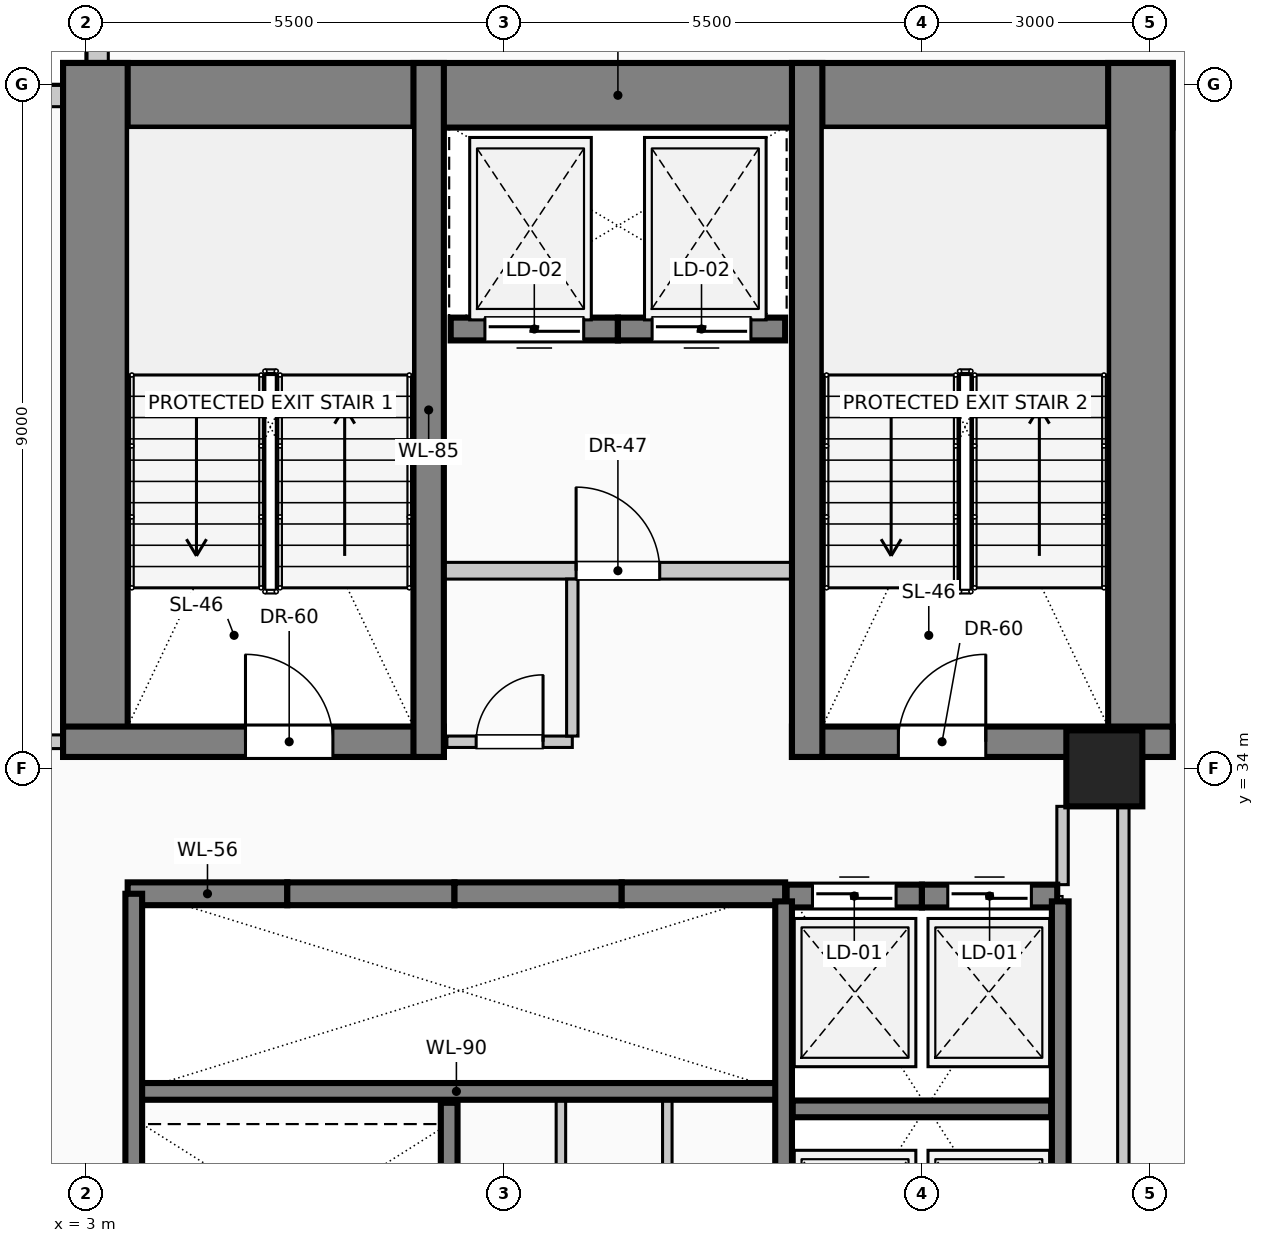
"""IFC4 building model, lengths in metres.
Left out: names, types, materials, properties, quantities, classifications, styles, units other than length and angle.
Written with IfcOpenShell. Run it as: python <this file> out.ifc"""

import sys

from ifc_helpers import new_model, si_unit, direction, frame, frame_2d, origin, origin_2d, place, context, subcontext, project, spatial, rectangle, circle, extrude, element, fill, save


model = new_model("IFC4")
c1 = context("Model", 3, precision=1e-05, world=origin(), true_north=direction((0.0, 1.0)))
c2 = subcontext(c1, "Body", "Model", "MODEL_VIEW")
j1 = project(units=[si_unit("LENGTHUNIT", "METRE"), si_unit("PLANEANGLEUNIT", "RADIAN")], contexts=[c1])
p1 = place(None, origin())
s1 = spatial("IfcSite", under=j1, at=p1, CompositionType="ELEMENT")
p2 = place(p1, origin())
s2 = spatial("IfcBuilding", under=s1, at=p2, CompositionType="ELEMENT")
p3 = place(p2, frame((0.0, 0.0, 156.6)))
s3 = spatial("IfcBuildingStorey", under=s2, at=p3, CompositionType="ELEMENT", Elevation=156.6)
p4 = place(p3, frame((2.7, 42.855, 0.0), z_axis=(0.0, 0.0, 1.0), x_axis=(1.0, 0.0, 0.0)))
e1 = element("IfcWall", 1, at=p4, inside=s3, PredefinedType="SHEAR", context=c2, shape_type="SweptSolid", body=[
    extrude(rectangle(XDim=14.6, YDim=0.85, at=frame_2d((7.3, 0.0))), origin(), (0.0, 0.0, 1.0), 4.0),
])
for number, where, z_axis, x_axis in (
    (2, (3.125, 34.15, 0.0), (0.0, 0.0, 1.0), (0.0, 1.0, 0.0)),
    (3, (16.875, 34.15, 0.0), (0.0, 0.0, 1.0), (0.0, 1.0, 0.0)),
):
    element("IfcWall", number, at=place(p3, frame(where, z_axis=z_axis, x_axis=x_axis)), inside=s3, PredefinedType="SHEAR", context=c2, shape_type="SweptSolid", body=[
        extrude(rectangle(XDim=9.13, YDim=0.85, at=frame_2d((4.565, 0.0))), origin(), (0.0, 0.0, 1.0), 4.0),
    ])
p5 = place(p3, frame((2.7, 34.35, 0.0), z_axis=(0.0, 0.0, 1.0), x_axis=(1.0, 0.0, 0.0)))
e4 = element("IfcWall", 4, at=p5, inside=s3, PredefinedType="SHEAR", context=c2, shape_type="SweptSolid", body=[
    extrude(rectangle(XDim=5.01, YDim=0.4, at=frame_2d((2.505, 0.0))), origin(), (0.0, 0.0, 1.0), 4.0),
])
p6 = place(p5, frame((2.4, 0.0, 0.0)))
e5 = element("IfcOpeningElement", 5, at=p6, cuts=e4, PredefinedType="OPENING", context=c2, shape_type="SweptSolid", body=[
    extrude(rectangle(XDim=1.15, YDim=2.2, at=frame_2d((0.575, 1.1))), frame((0.0, 0.21, 0.0), z_axis=(0.0, -1.0, 0.0), x_axis=(1.0, 0.0, 0.0)), (0.0, 0.0, 1.0), 0.42),
])
p7 = place(p3, frame((12.29, 34.35, 0.0), z_axis=(0.0, 0.0, 1.0), x_axis=(1.0, 0.0, 0.0)))
e6 = element("IfcWall", 6, at=p7, inside=s3, PredefinedType="SHEAR", context=c2, shape_type="SweptSolid", body=[
    extrude(rectangle(XDim=5.01, YDim=0.4, at=frame_2d((2.505, 0.0))), origin(), (0.0, 0.0, 1.0), 4.0),
])
p8 = place(p7, frame((1.4, 0.0, 0.0)))
e7 = element("IfcOpeningElement", 7, at=p8, cuts=e6, PredefinedType="OPENING", context=c2, shape_type="SweptSolid", body=[
    extrude(rectangle(XDim=1.15, YDim=2.2, at=frame_2d((0.575, 1.1))), frame((0.0, 0.21, 0.0), z_axis=(0.0, -1.0, 0.0), x_axis=(1.0, 0.0, 0.0)), (0.0, 0.0, 1.0), 0.42),
])
for number, where, z_axis, x_axis in (
    (8, (7.51, 34.15, 0.0), (0.0, 0.0, 1.0), (0.0, 1.0, 0.0)),
    (9, (12.49, 34.15, 0.0), (0.0, 0.0, 1.0), (0.0, 1.0, 0.0)),
):
    element("IfcWall", number, at=place(p3, frame(where, z_axis=z_axis, x_axis=x_axis)), inside=s3, PredefinedType="SHEAR", context=c2, shape_type="SweptSolid", body=[
        extrude(rectangle(XDim=9.13, YDim=0.4, at=frame_2d((4.565, 0.0))), origin(), (0.0, 0.0, 1.0), 4.0),
    ])
p9 = place(p3, frame((16.4, 34.0, 0.0), z_axis=(0.0, 0.0, 1.0), x_axis=(1.0, 0.0, 0.0)))
e10 = element("IfcColumn", 10, at=p9, inside=s3, PredefinedType="COLUMN", context=c2, shape_type="SweptSolid", body=[
    extrude(circle(Radius=0.5, at=origin_2d()), origin(), (0.0, 0.0, 1.0), 4.0),
])
p10 = place(p3, frame((0.6, 42.845, 0.0), z_axis=(0.0, 0.0, 1.0), x_axis=(1.0, 0.0, 0.0)))
e11 = element("IfcWall", 11, at=p10, inside=s3, PredefinedType="SOLIDWALL", context=c2, shape_type="SweptSolid", body=[
    extrude(rectangle(XDim=2.095, YDim=0.28, at=frame_2d((1.047, 0.0))), origin(), (0.0, 0.0, 1.0), 3.66),
])
p11 = place(p3, frame((3.155, 43.285, 0.0), z_axis=(0.0, 0.0, 1.0), x_axis=(0.0, 1.0, 0.0)))
e12 = element("IfcWall", 12, at=p11, inside=s3, PredefinedType="SOLIDWALL", context=c2, shape_type="SweptSolid", body=[
    extrude(rectangle(XDim=2.115, YDim=0.28, at=frame_2d((1.058, 0.0))), origin(), (0.0, 0.0, 1.0), 3.66),
])
p12 = place(p3, frame((12.22, 32.32, 0.0), z_axis=(0.0, 0.0, 1.0), x_axis=(1.0, 0.0, 0.0)))
e13 = element("IfcWall", 13, at=p12, inside=s3, PredefinedType="SOLIDWALL", context=c2, shape_type="SweptSolid", body=[
    extrude(rectangle(XDim=1.78, YDim=0.3, at=frame_2d((0.89, 0.0))), origin(), (0.0, 0.0, 1.0), 4.0),
])
p13 = place(p12, frame((0.34, 0.0, 0.0)))
e14 = element("IfcOpeningElement", 14, at=p13, cuts=e13, PredefinedType="OPENING", context=c2, shape_type="SweptSolid", body=[
    extrude(rectangle(XDim=1.1, YDim=2.2, at=frame_2d((0.55, 1.1))), frame((0.0, 0.16, 0.0), z_axis=(0.0, -1.0, 0.0), x_axis=(1.0, 0.0, 0.0)), (0.0, 0.0, 1.0), 0.32),
])
p14 = place(p3, frame((14.0, 32.32, 0.0), z_axis=(0.0, 0.0, 1.0), x_axis=(1.0, 0.0, 0.0)))
e15 = element("IfcWall", 15, at=p14, inside=s3, PredefinedType="SOLIDWALL", context=c2, shape_type="SweptSolid", body=[
    extrude(rectangle(XDim=1.78, YDim=0.3, at=frame_2d((0.89, 0.0))), origin(), (0.0, 0.0, 1.0), 4.0),
])
p15 = place(p14, frame((0.34, 0.0, 0.0)))
e16 = element("IfcOpeningElement", 16, at=p15, cuts=e15, PredefinedType="OPENING", context=c2, shape_type="SweptSolid", body=[
    extrude(rectangle(XDim=1.1, YDim=2.2, at=frame_2d((0.55, 1.1))), frame((0.0, 0.16, 0.0), z_axis=(0.0, -1.0, 0.0), x_axis=(1.0, 0.0, 0.0)), (0.0, 0.0, 1.0), 0.32),
])
p16 = place(p3, frame((3.55, 32.35, 0.0), z_axis=(0.0, 0.0, 1.0), x_axis=(1.0, 0.0, 0.0)))
e17 = element("IfcWall", 17, at=p16, inside=s3, PredefinedType="SOLIDWALL", context=c2, shape_type="SweptSolid", body=[
    extrude(rectangle(XDim=2.1, YDim=0.3, at=frame_2d((1.05, 0.0))), origin(), (0.0, 0.0, 1.0), 4.0),
])
p17 = place(p3, frame((5.65, 32.35, 0.0), z_axis=(0.0, 0.0, 1.0), x_axis=(1.0, 0.0, 0.0)))
e18 = element("IfcWall", 18, at=p17, inside=s3, PredefinedType="SOLIDWALL", context=c2, shape_type="SweptSolid", body=[
    extrude(rectangle(XDim=2.2, YDim=0.3, at=frame_2d((1.1, 0.0))), origin(), (0.0, 0.0, 1.0), 4.0),
])
p18 = place(p3, frame((7.85, 32.35, 0.0), z_axis=(0.0, 0.0, 1.0), x_axis=(1.0, 0.0, 0.0)))
e19 = element("IfcWall", 19, at=p18, inside=s3, PredefinedType="SOLIDWALL", context=c2, shape_type="SweptSolid", body=[
    extrude(rectangle(XDim=2.2, YDim=0.3, at=frame_2d((1.1, 0.0))), origin(), (0.0, 0.0, 1.0), 4.0),
])
p19 = place(p3, frame((10.05, 32.35, 0.0), z_axis=(0.0, 0.0, 1.0), x_axis=(1.0, 0.0, 0.0)))
e20 = element("IfcWall", 20, at=p19, inside=s3, PredefinedType="SOLIDWALL", context=c2, shape_type="SweptSolid", body=[
    extrude(rectangle(XDim=2.15, YDim=0.3, at=frame_2d((1.075, 0.0))), origin(), (0.0, 0.0, 1.0), 4.0),
])
p20 = place(p3, frame((10.0, 39.78, 0.0), z_axis=(0.0, 0.0, 1.0), x_axis=(-1.0, 0.0, 0.0)))
e21 = element("IfcWall", 21, at=p20, inside=s3, PredefinedType="SOLIDWALL", context=c2, shape_type="SweptSolid", body=[
    extrude(rectangle(XDim=2.2, YDim=0.3, at=frame_2d((1.1, 0.0))), origin(), (0.0, 0.0, 1.0), 4.0),
])
p21 = place(p20, frame((0.45, 0.0, 0.0)))
e22 = element("IfcOpeningElement", 22, at=p21, cuts=e21, PredefinedType="OPENING", context=c2, shape_type="SweptSolid", body=[
    extrude(rectangle(XDim=1.3, YDim=2.25, at=frame_2d((0.65, 1.125))), frame((0.0, 0.16, 0.0), z_axis=(0.0, -1.0, 0.0), x_axis=(1.0, 0.0, 0.0)), (0.0, 0.0, 1.0), 0.32),
])
p22 = place(p3, frame((12.2, 39.78, 0.0), z_axis=(0.0, 0.0, 1.0), x_axis=(-1.0, 0.0, 0.0)))
e23 = element("IfcWall", 23, at=p22, inside=s3, PredefinedType="SOLIDWALL", context=c2, shape_type="SweptSolid", body=[
    extrude(rectangle(XDim=2.2, YDim=0.3, at=frame_2d((1.1, 0.0))), origin(), (0.0, 0.0, 1.0), 4.0),
])
p23 = place(p22, frame((0.45, 0.0, 0.0)))
e24 = element("IfcOpeningElement", 24, at=p23, cuts=e23, PredefinedType="OPENING", context=c2, shape_type="SweptSolid", body=[
    extrude(rectangle(XDim=1.3, YDim=2.25, at=frame_2d((0.65, 1.125))), frame((0.0, 0.16, 0.0), z_axis=(0.0, -1.0, 0.0), x_axis=(1.0, 0.0, 0.0)), (0.0, 0.0, 1.0), 0.32),
])
p24 = place(p3, frame((3.55, 29.75, 0.0), z_axis=(0.0, 0.0, 1.0), x_axis=(1.0, 0.0, 0.0)))
e25 = element("IfcWall", 25, at=p24, inside=s3, PredefinedType="SOLIDWALL", context=c2, shape_type="SweptSolid", body=[
    extrude(rectangle(XDim=8.65, YDim=0.22, at=frame_2d((4.325, 0.0))), origin(), (0.0, 0.0, 1.0), 4.0),
])
p25 = place(p3, frame((3.63, 26.8, 0.0), z_axis=(0.0, 0.0, 1.0), x_axis=(0.0, 1.0, 0.0)))
e26 = element("IfcWall", 26, at=p25, inside=s3, PredefinedType="SOLIDWALL", context=c2, shape_type="SweptSolid", body=[
    extrude(rectangle(XDim=5.55, YDim=0.22, at=frame_2d((2.775, 0.0))), origin(), (0.0, 0.0, 1.0), 4.0),
])
p26 = place(p3, frame((7.78, 26.8, 0.0), z_axis=(0.0, 0.0, 1.0), x_axis=(0.0, 1.0, 0.0)))
e27 = element("IfcWall", 27, at=p26, inside=s3, PredefinedType="SOLIDWALL", context=c2, shape_type="SweptSolid", body=[
    extrude(rectangle(XDim=2.8, YDim=0.22, at=frame_2d((1.4, 0.0))), origin(), (0.0, 0.0, 1.0), 4.0),
])
for number, where, z_axis, x_axis in (
    (28, (12.18, 26.8, 0.0), (0.0, 0.0, 1.0), (0.0, 1.0, 0.0)),
    (29, (15.82, 26.8, 0.0), (0.0, 0.0, 1.0), (0.0, 1.0, 0.0)),
):
    element("IfcWall", number, at=place(p3, frame(where, z_axis=z_axis, x_axis=x_axis)), inside=s3, PredefinedType="SOLIDWALL", context=c2, shape_type="SweptSolid", body=[
        extrude(rectangle(XDim=5.45, YDim=0.22, at=frame_2d((2.725, 0.0))), origin(), (0.0, 0.0, 1.0), 4.0),
    ])
p27 = place(p3, frame((12.3, 29.52, 0.0), z_axis=(0.0, 0.0, 1.0), x_axis=(1.0, 0.0, 0.0)))
e30 = element("IfcWall", 30, at=p27, inside=s3, PredefinedType="SOLIDWALL", context=c2, shape_type="SweptSolid", body=[
    extrude(rectangle(XDim=3.4, YDim=0.22, at=frame_2d((1.7, 0.0))), origin(), (0.0, 0.0, 1.0), 4.0),
])
p28 = place(p3, frame((7.51, 36.6, 0.0), z_axis=(0.0, 0.0, 1.0), x_axis=(1.0, 0.0, 0.0)))
e31 = element("IfcWall", 31, at=p28, inside=s3, PredefinedType="PARTITIONING", context=c2, shape_type="SweptSolid", body=[
    extrude(rectangle(XDim=4.98, YDim=0.22, at=frame_2d((2.49, 0.0))), origin(), (0.0, 0.0, 1.0), 3.66),
])
p29 = place(p28, frame((1.94, 0.0, 0.0)))
e32 = element("IfcOpeningElement", 32, at=p29, cuts=e31, PredefinedType="OPENING", context=c2, shape_type="SweptSolid", body=[
    extrude(rectangle(XDim=1.1, YDim=2.2, at=frame_2d((0.55, 1.1))), frame((0.0, 0.12, 0.0), z_axis=(0.0, -1.0, 0.0), x_axis=(1.0, 0.0, 0.0)), (0.0, 0.0, 1.0), 0.24),
])
p30 = place(p3, frame((1.175, 34.35, 0.0), z_axis=(0.0, 0.0, 1.0), x_axis=(1.0, 0.0, 0.0)))
e33 = element("IfcWall", 33, at=p30, inside=s3, PredefinedType="PARTITIONING", context=c2, shape_type="SweptSolid", body=[
    extrude(rectangle(XDim=1.525, YDim=0.18, at=frame_2d((0.762, 0.0))), origin(), (0.0, 0.0, 1.0), 3.66),
])
p31 = place(p3, frame((7.75, 34.35, 0.0), z_axis=(0.0, 0.0, 1.0), x_axis=(1.0, 0.0, 0.0)))
e34 = element("IfcWall", 34, at=p31, inside=s3, PredefinedType="PARTITIONING", context=c2, shape_type="SweptSolid", body=[
    extrude(rectangle(XDim=1.65, YDim=0.15, at=frame_2d((0.825, 0.0))), origin(), (0.0, 0.0, 1.0), 3.66),
])
p32 = place(p31, frame((0.385, 0.0, 0.0)))
e35 = element("IfcOpeningElement", 35, at=p32, cuts=e34, PredefinedType="OPENING", context=c2, shape_type="SweptSolid", body=[
    extrude(rectangle(XDim=0.88, YDim=2.1, at=frame_2d((0.44, 1.05))), frame((0.0, 0.085, 0.0), z_axis=(0.0, -1.0, 0.0), x_axis=(1.0, 0.0, 0.0)), (0.0, 0.0, 1.0), 0.17),
])
p33 = place(p3, frame((9.25, 26.863, 0.0), z_axis=(0.0, 0.0, 1.0), x_axis=(0.0, 1.0, 0.0)))
e36 = element("IfcWall", 36, at=p33, inside=s3, PredefinedType="PARTITIONING", context=c2, shape_type="SweptSolid", body=[
    extrude(rectangle(XDim=2.777, YDim=0.125, at=frame_2d((1.389, 0.0))), origin(), (0.0, 0.0, 1.0), 3.66),
])
p34 = place(p3, frame((9.4, 34.425, 0.0), z_axis=(0.0, 0.0, 1.0), x_axis=(0.0, 1.0, 0.0)))
e37 = element("IfcWall", 37, at=p34, inside=s3, PredefinedType="PARTITIONING", context=c2, shape_type="SweptSolid", body=[
    extrude(rectangle(XDim=2.065, YDim=0.15, at=frame_2d((1.032, 0.0))), origin(), (0.0, 0.0, 1.0), 3.66),
])
p35 = place(p3, frame((10.65, 26.863, 0.0), z_axis=(0.0, 0.0, 1.0), x_axis=(0.0, 1.0, 0.0)))
e38 = element("IfcWall", 38, at=p35, inside=s3, PredefinedType="PARTITIONING", context=c2, shape_type="SweptSolid", body=[
    extrude(rectangle(XDim=2.777, YDim=0.125, at=frame_2d((1.389, 0.0))), origin(), (0.0, 0.0, 1.0), 3.66),
])
p36 = place(p3, frame((15.85, 32.47, 0.0), z_axis=(0.0, 0.0, 1.0), x_axis=(0.0, 1.0, 0.0)))
e39 = element("IfcWall", 39, at=p36, inside=s3, PredefinedType="PARTITIONING", context=c2, shape_type="SweptSolid", body=[
    extrude(rectangle(XDim=1.03, YDim=0.15, at=frame_2d((0.515, 0.0))), origin(), (0.0, 0.0, 1.0), 3.66),
])
p37 = place(p3, frame((16.65, 28.275, 0.0), z_axis=(0.0, 0.0, 1.0), x_axis=(0.0, 1.0, 0.0)))
e40 = element("IfcWall", 40, at=p37, inside=s3, PredefinedType="PARTITIONING", context=c2, shape_type="SweptSolid", body=[
    extrude(rectangle(XDim=5.225, YDim=0.15, at=frame_2d((2.613, 0.0))), origin(), (0.0, 0.0, 1.0), 3.005),
])
p38 = place(p13, origin())
e41 = element("IfcDoor", 41, at=p38, inside=s3, OperationType="SLIDING_TO_LEFT", PredefinedType="DOOR", context=c2, shape_type="SweptSolid", body=[
    extrude(rectangle(XDim=1.1, YDim=2.2, at=frame_2d((0.55, 1.1))), frame((0.0, 0.025, 0.0), z_axis=(0.0, -1.0, 0.0), x_axis=(1.0, 0.0, 0.0)), (0.0, 0.0, 1.0), 0.05),
])
fill(e14, e41)
p39 = place(p15, origin())
e42 = element("IfcDoor", 42, at=p39, inside=s3, OperationType="SLIDING_TO_RIGHT", PredefinedType="DOOR", context=c2, shape_type="SweptSolid", body=[
    extrude(rectangle(XDim=1.1, YDim=2.2, at=frame_2d((0.55, 1.1))), frame((0.0, 0.025, 0.0), z_axis=(0.0, -1.0, 0.0), x_axis=(1.0, 0.0, 0.0)), (0.0, 0.0, 1.0), 0.05),
])
fill(e16, e42)
p40 = place(p21, origin())
e43 = element("IfcDoor", 43, at=p40, inside=s3, OperationType="SLIDING_TO_LEFT", PredefinedType="DOOR", context=c2, shape_type="SweptSolid", body=[
    extrude(rectangle(XDim=1.3, YDim=2.25, at=frame_2d((0.65, 1.125))), frame((0.0, 0.025, 0.0), z_axis=(0.0, -1.0, 0.0), x_axis=(1.0, 0.0, 0.0)), (0.0, 0.0, 1.0), 0.05),
])
fill(e22, e43)
p41 = place(p23, origin())
e44 = element("IfcDoor", 44, at=p41, inside=s3, OperationType="SLIDING_TO_RIGHT", PredefinedType="DOOR", context=c2, shape_type="SweptSolid", body=[
    extrude(rectangle(XDim=1.3, YDim=2.25, at=frame_2d((0.65, 1.125))), frame((0.0, 0.025, 0.0), z_axis=(0.0, -1.0, 0.0), x_axis=(1.0, 0.0, 0.0)), (0.0, 0.0, 1.0), 0.05),
])
fill(e24, e44)
p42 = place(p6, origin())
e45 = element("IfcDoor", 45, at=p42, inside=s3, OperationType="SINGLE_SWING_LEFT", PredefinedType="DOOR", context=c2, shape_type="SweptSolid", body=[
    extrude(rectangle(XDim=1.15, YDim=2.2, at=frame_2d((0.575, 1.1))), frame((0.0, 0.025, 0.0), z_axis=(0.0, -1.0, 0.0), x_axis=(1.0, 0.0, 0.0)), (0.0, 0.0, 1.0), 0.05),
])
fill(e5, e45)
p43 = place(p8, origin())
e46 = element("IfcDoor", 46, at=p43, inside=s3, OperationType="SINGLE_SWING_RIGHT", PredefinedType="DOOR", context=c2, shape_type="SweptSolid", body=[
    extrude(rectangle(XDim=1.15, YDim=2.2, at=frame_2d((0.575, 1.1))), frame((0.0, 0.025, 0.0), z_axis=(0.0, -1.0, 0.0), x_axis=(1.0, 0.0, 0.0)), (0.0, 0.0, 1.0), 0.05),
])
fill(e7, e46)
p44 = place(p29, origin())
e47 = element("IfcDoor", 47, at=p44, inside=s3, OperationType="SINGLE_SWING_LEFT", PredefinedType="DOOR", context=c2, shape_type="SweptSolid", body=[
    extrude(rectangle(XDim=1.1, YDim=2.2, at=frame_2d((0.55, 1.1))), frame((0.0, 0.025, 0.0), z_axis=(0.0, -1.0, 0.0), x_axis=(1.0, 0.0, 0.0)), (0.0, 0.0, 1.0), 0.05),
])
fill(e32, e47)
p45 = place(p32, origin())
e48 = element("IfcDoor", 48, at=p45, inside=s3, OperationType="SINGLE_SWING_RIGHT", PredefinedType="DOOR", context=c2, shape_type="SweptSolid", body=[
    extrude(rectangle(XDim=0.88, YDim=2.1, at=frame_2d((0.44, 1.05))), frame((0.0, 0.025, 0.0), z_axis=(0.0, -1.0, 0.0), x_axis=(1.0, 0.0, 0.0)), (0.0, 0.0, 1.0), 0.05),
])
fill(e35, e48)
save(model, sys.argv[1])
